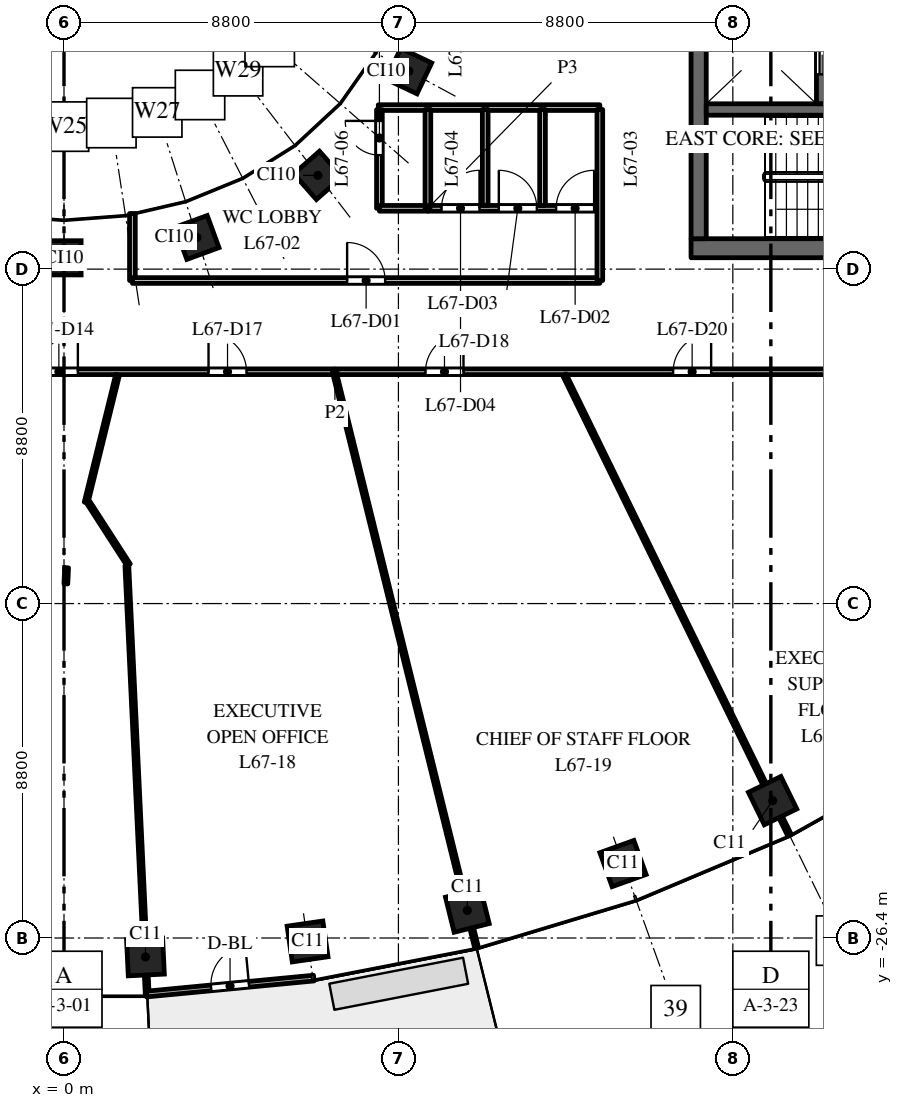
"""IFC4 building model, lengths in metres.
Left out: names, types, materials, properties, quantities, classifications, styles, units other than length and angle.
Written with IfcOpenShell. Run it as: python <this file> out.ifc"""

import sys

from ifc_helpers import new_model, si_unit, direction, frame, frame_2d, origin, origin_2d, place, context, subcontext, project, spatial, rectangle, extrude, element, fill, save


model = new_model("IFC4")
c1 = context("Model", 3, precision=1e-05, world=origin(), true_north=direction((0.0, 1.0)))
c2 = subcontext(c1, "Body", "Model", "MODEL_VIEW")
j1 = project(units=[si_unit("LENGTHUNIT", "METRE"), si_unit("PLANEANGLEUNIT", "RADIAN")], contexts=[c1])
p1 = place(None, origin())
s1 = spatial("IfcSite", under=j1, at=p1, CompositionType="ELEMENT")
p2 = place(p1, origin())
s2 = spatial("IfcBuilding", under=s1, at=p2, CompositionType="ELEMENT")
p3 = place(p2, frame((0.0, 0.0, 311.0)))
s3 = spatial("IfcBuildingStorey", under=s2, at=p3, CompositionType="ELEMENT", Elevation=311.0)
for number, where, z_axis, x_axis in (
    (1, (2.143, -26.898, 0.0), (0.0, 0.0, 1.0), (0.999, 0.048, 0.0)),
    (2, (6.409, -26.491, 0.0), (0.0, 0.0, 1.0), (0.99, 0.143, 0.0)),
    (3, (10.613, -25.674, 0.0), (0.0, 0.0, 1.0), (0.971, 0.24, 0.0)),
    (4, (14.709, -24.441, 0.0), (0.0, 0.0, 1.0), (0.941, 0.338, 0.0)),
    (5, (18.646, -22.785, 0.0), (0.0, 0.0, 1.0), (0.898, 0.439, 0.0)),
):
    element("IfcColumn", number, at=place(p3, frame(where, z_axis=z_axis, x_axis=x_axis)), inside=s3, PredefinedType="COLUMN", context=c2, shape_type="SweptSolid", body=[
        extrude(rectangle(XDim=0.95, YDim=0.95, at=origin_2d()), origin(), (0.0, 0.0, 1.0), 4.0),
    ])
for number, where, z_axis, x_axis in (
    (6, (0.0, -8.503, 0.0), (0.0, 0.0, 1.0), (1.0, 0.0, 0.0)),
    (7, (3.501, -7.967, 0.0), (0.0, 0.0, 1.0), (0.939, 0.344, 0.0)),
    (8, (6.682, -6.334, 0.0), (0.0, 0.0, 1.0), (0.751, 0.66, 0.0)),
    (9, (9.076, -3.588, 0.0), (0.0, 0.0, 1.0), (0.429, 0.903, 0.0)),
):
    element("IfcColumn", number, at=place(p3, frame(where, z_axis=z_axis, x_axis=x_axis)), inside=s3, PredefinedType="COLUMN", context=c2, shape_type="SweptSolid", body=[
        extrude(rectangle(XDim=0.9, YDim=0.9, at=origin_2d()), origin(), (0.0, 0.0, 1.0), 4.0),
    ])
p4 = place(p3, frame((16.5, -8.25, 0.0), z_axis=(0.0, 0.0, 1.0), x_axis=(1.0, 0.0, 0.0)))
e10 = element("IfcWall", 10, at=p4, inside=s3, PredefinedType="SHEAR", context=c2, shape_type="SweptSolid", body=[
    extrude(rectangle(XDim=15.0, YDim=0.5, at=frame_2d((7.5, 0.0))), origin(), (0.0, 0.0, 1.0), 3.7),
])
p5 = place(p4, frame((6.9, 0.0, 0.0)))
e11 = element("IfcOpeningElement", 11, at=p5, cuts=e10, PredefinedType="OPENING", context=c2, shape_type="SweptSolid", body=[
    extrude(rectangle(XDim=1.2, YDim=2.1, at=frame_2d((0.6, 1.05))), frame((0.0, 0.26, 0.0), z_axis=(0.0, -1.0, 0.0), x_axis=(1.0, 0.0, 0.0)), (0.0, 0.0, 1.0), 0.52),
])
p6 = place(p4, frame((12.275, 0.0, 0.0)))
e12 = element("IfcOpeningElement", 12, at=p6, cuts=e10, PredefinedType="OPENING", context=c2, shape_type="SweptSolid", body=[
    extrude(rectangle(XDim=0.9, YDim=2.1, at=frame_2d((0.45, 1.05))), frame((0.0, 0.26, 0.0), z_axis=(0.0, -1.0, 0.0), x_axis=(1.0, 0.0, 0.0)), (0.0, 0.0, 1.0), 0.52),
])
p7 = place(p3, frame((19.95, -4.45, 0.0), z_axis=(0.0, 0.0, 1.0), x_axis=(0.0, 1.0, 0.0)))
e13 = element("IfcWall", 13, at=p7, inside=s3, PredefinedType="SHEAR", context=c2, shape_type="SweptSolid", body=[
    extrude(rectangle(XDim=8.9, YDim=0.3, at=frame_2d((4.45, 0.0))), origin(), (0.0, 0.0, 1.0), 3.7),
])
p8 = place(p7, frame((0.775, 0.0, 0.0)))
e14 = element("IfcOpeningElement", 14, at=p8, cuts=e13, PredefinedType="OPENING", context=c2, shape_type="SweptSolid", body=[
    extrude(rectangle(XDim=1.2, YDim=2.1, at=frame_2d((0.6, 1.05))), frame((0.0, 0.16, 0.0), z_axis=(0.0, -1.0, 0.0), x_axis=(1.0, 0.0, 0.0)), (0.0, 0.0, 1.0), 0.32),
])
p9 = place(p7, frame((6.0, 0.0, 0.0)))
e15 = element("IfcOpeningElement", 15, at=p9, cuts=e13, PredefinedType="OPENING", context=c2, shape_type="SweptSolid", body=[
    extrude(rectangle(XDim=0.9, YDim=2.1, at=frame_2d((0.45, 1.05))), frame((0.0, 0.16, 0.0), z_axis=(0.0, -1.0, 0.0), x_axis=(1.0, 0.0, 0.0)), (0.0, 0.0, 1.0), 0.32),
])
p10 = place(p3, frame((16.7, -8.0, 0.0), z_axis=(0.0, 0.0, 1.0), x_axis=(0.0, 1.0, 0.0)))
e16 = element("IfcWall", 16, at=p10, inside=s3, PredefinedType="SHEAR", context=c2, shape_type="SweptSolid", body=[
    extrude(rectangle(XDim=16.0, YDim=0.4, at=frame_2d((8.0, 0.0))), origin(), (0.0, 0.0, 1.0), 3.7),
])
p11 = place(p3, frame((16.9, -4.6, 0.0), z_axis=(0.0, 0.0, 1.0), x_axis=(1.0, 0.0, 0.0)))
e17 = element("IfcWall", 17, at=p11, inside=s3, PredefinedType="SHEAR", context=c2, shape_type="SweptSolid", body=[
    extrude(rectangle(XDim=6.18, YDim=0.3, at=frame_2d((3.09, 0.0))), origin(), (0.0, 0.0, 1.0), 3.7),
])
p12 = place(p11, frame((4.9, 0.0, 0.0)))
e18 = element("IfcOpeningElement", 18, at=p12, cuts=e17, PredefinedType="OPENING", context=c2, shape_type="SweptSolid", body=[
    extrude(rectangle(XDim=1.1, YDim=2.1, at=frame_2d((0.55, 1.05))), frame((0.0, 0.16, 0.0), z_axis=(0.0, -1.0, 0.0), x_axis=(1.0, 0.0, 0.0)), (0.0, 0.0, 1.0), 0.32),
])
p13 = place(p3, frame((2.166, -27.875, 0.0), z_axis=(0.0, 0.0, 1.0), x_axis=(0.995473879823, 0.095035543824, 0.0)))
e19 = element("IfcWall", 19, at=p13, inside=s3, PredefinedType="STANDARD", context=c2, shape_type="SweptSolid", body=[
    extrude(rectangle(XDim=4.426, YDim=0.15, at=frame_2d((2.213, 0.0))), origin(), (0.0, 0.0, 1.0), 3.7),
])
p14 = place(p13, frame((1.713, 0.0, 0.0)))
e20 = element("IfcOpeningElement", 20, at=p14, cuts=e19, PredefinedType="OPENING", context=c2, shape_type="SweptSolid", body=[
    extrude(rectangle(XDim=1.0, YDim=2.4, at=frame_2d((0.5, 1.2))), frame((0.0, 0.085, 0.0), z_axis=(0.0, -1.0, 0.0), x_axis=(1.0, 0.0, 0.0)), (0.0, 0.0, 1.0), 0.17),
])
p15 = place(p3, frame((-1.774, -11.5, 0.0), z_axis=(0.0, 0.0, 1.0), x_axis=(1.0, 0.0, 0.0)))
e21 = element("IfcWall", 21, at=p15, inside=s3, PredefinedType="PARTITIONING", context=c2, shape_type="SweptSolid", body=[
    extrude(rectangle(XDim=8.886, YDim=0.15, at=frame_2d((4.443, 0.0))), origin(), (0.0, 0.0, 1.0), 2.85),
])
p16 = place(p15, frame((1.139, 0.0, 0.0)))
e22 = element("IfcOpeningElement", 22, at=p16, cuts=e21, PredefinedType="OPENING", context=c2, shape_type="SweptSolid", body=[
    extrude(rectangle(XDim=1.0, YDim=2.1, at=frame_2d((0.5, 1.05))), frame((0.0, 0.085, 0.0), z_axis=(0.0, -1.0, 0.0), x_axis=(1.0, 0.0, 0.0)), (0.0, 0.0, 1.0), 0.17),
])
p17 = place(p15, frame((5.577, 0.0, 0.0)))
e23 = element("IfcOpeningElement", 23, at=p17, cuts=e21, PredefinedType="OPENING", context=c2, shape_type="SweptSolid", body=[
    extrude(rectangle(XDim=1.0, YDim=2.1, at=frame_2d((0.5, 1.05))), frame((0.0, 0.085, 0.0), z_axis=(0.0, -1.0, 0.0), x_axis=(1.0, 0.0, 0.0)), (0.0, 0.0, 1.0), 0.17),
])
p18 = place(p3, frame((0.049, -17.081, 0.0), z_axis=(0.0, 0.0, 1.0), x_axis=(0.047263912187, 0.998882436829, 0.0)))
e24 = element("IfcWall", 24, at=p18, inside=s3, PredefinedType="PARTITIONING", context=c2, shape_type="SweptSolid", body=[
    extrude(rectangle(XDim=0.424, YDim=0.1, at=frame_2d((0.212, 0.0))), origin(), (0.0, 0.0, 1.0), 3.7),
])
p19 = place(p3, frame((0.582, -14.941, 0.0), z_axis=(0.0, 0.0, 1.0), x_axis=(0.239198168936, 0.970970769888, 0.0)))
e25 = element("IfcWall", 25, at=p19, inside=s3, PredefinedType="PARTITIONING", context=c2, shape_type="SweptSolid", body=[
    extrude(rectangle(XDim=1.601, YDim=0.1, at=frame_2d((0.801, 0.0))), origin(), (0.0, 0.0, 1.0), 3.7),
])
p20 = place(p3, frame((0.635, -14.932, 0.0), z_axis=(0.0, 0.0, 1.0), x_axis=(0.542268183011, -0.840205461595, 0.0)))
e26 = element("IfcWall", 26, at=p20, inside=s3, PredefinedType="PARTITIONING", context=c2, shape_type="SweptSolid", body=[
    extrude(rectangle(XDim=1.968, YDim=0.1, at=frame_2d((0.984, 0.0))), origin(), (0.0, 0.0, 1.0), 3.7),
])
p21 = place(p3, frame((0.969, -13.369, 0.0), z_axis=(0.0, 0.0, 1.0), x_axis=(0.239699020522, 0.970847248315, 0.0)))
e27 = element("IfcWall", 27, at=p21, inside=s3, PredefinedType="PARTITIONING", context=c2, shape_type="SweptSolid", body=[
    extrude(rectangle(XDim=1.844, YDim=0.1, at=frame_2d((0.922, 0.0))), origin(), (0.0, 0.0, 1.0), 3.7),
])
p22 = place(p3, frame((1.654, -16.601, 0.0), z_axis=(0.0, 0.0, 1.0), x_axis=(0.047383612141, -0.998876765823, 0.0)))
e28 = element("IfcWall", 28, at=p22, inside=s3, PredefinedType="PARTITIONING", context=c2, shape_type="SweptSolid", body=[
    extrude(rectangle(XDim=11.31, YDim=0.1, at=frame_2d((5.655, 0.0))), origin(), (0.0, 0.0, 1.0), 3.0),
])
p23 = place(p3, frame((1.8, -9.1, 0.0), z_axis=(0.0, 0.0, 1.0), x_axis=(0.0, 1.0, 0.0)))
e29 = element("IfcWall", 29, at=p23, inside=s3, PredefinedType="PARTITIONING", context=c2, shape_type="SweptSolid", body=[
    extrude(rectangle(XDim=1.764, YDim=0.15, at=frame_2d((0.882, 0.0))), origin(), (0.0, 0.0, 1.0), 3.0),
])
p24 = place(p3, frame((1.8, -9.1, 0.0), z_axis=(0.0, 0.0, 1.0), x_axis=(1.0, 0.0, 0.0)))
e30 = element("IfcWall", 30, at=p24, inside=s3, PredefinedType="PARTITIONING", context=c2, shape_type="SweptSolid", body=[
    extrude(rectangle(XDim=12.3, YDim=0.15, at=frame_2d((6.15, 0.0))), origin(), (0.0, 0.0, 1.0), 2.85),
])
p25 = place(p24, frame((5.65, 0.0, 0.0)))
e31 = element("IfcOpeningElement", 31, at=p25, cuts=e30, PredefinedType="OPENING", context=c2, shape_type="SweptSolid", body=[
    extrude(rectangle(XDim=1.0, YDim=2.1, at=frame_2d((0.5, 1.05))), frame((0.0, 0.085, 0.0), z_axis=(0.0, -1.0, 0.0), x_axis=(1.0, 0.0, 0.0)), (0.0, 0.0, 1.0), 0.17),
])
p26 = place(p3, frame((7.112, -11.5, 0.0), z_axis=(0.0, 0.0, 1.0), x_axis=(0.239846808941, -0.970810747901, 0.0)))
e32 = element("IfcWall", 32, at=p26, inside=s3, PredefinedType="PARTITIONING", context=c2, shape_type="SweptSolid", body=[
    extrude(rectangle(XDim=15.601, YDim=0.1, at=frame_2d((7.801, 0.0))), origin(), (0.0, 0.0, 1.0), 2.85),
])
p27 = place(p3, frame((7.129, -11.5, 0.0), z_axis=(0.0, 0.0, 1.0), x_axis=(1.0, 0.0, 0.0)))
e33 = element("IfcWall", 33, at=p27, inside=s3, PredefinedType="PARTITIONING", context=c2, shape_type="SweptSolid", body=[
    extrude(rectangle(XDim=24.371, YDim=0.15, at=frame_2d((12.186, 0.0))), origin(), (0.0, 0.0, 1.0), 2.75),
])
p28 = place(p27, frame((2.383, 0.0, 0.0)))
e34 = element("IfcOpeningElement", 34, at=p28, cuts=e33, PredefinedType="OPENING", context=c2, shape_type="SweptSolid", body=[
    extrude(rectangle(XDim=1.0, YDim=2.1, at=frame_2d((0.5, 1.05))), frame((0.0, 0.085, 0.0), z_axis=(0.0, -1.0, 0.0), x_axis=(1.0, 0.0, 0.0)), (0.0, 0.0, 1.0), 0.17),
])
p29 = place(p27, frame((8.9, 0.0, 0.0)))
e35 = element("IfcOpeningElement", 35, at=p29, cuts=e33, PredefinedType="OPENING", context=c2, shape_type="SweptSolid", body=[
    extrude(rectangle(XDim=1.0, YDim=2.1, at=frame_2d((0.5, 1.05))), frame((0.0, 0.085, 0.0), z_axis=(0.0, -1.0, 0.0), x_axis=(1.0, 0.0, 0.0)), (0.0, 0.0, 1.0), 0.17),
])
p30 = place(p27, frame((17.894, 0.0, 0.0)))
e36 = element("IfcOpeningElement", 36, at=p30, cuts=e33, PredefinedType="OPENING", context=c2, shape_type="SweptSolid", body=[
    extrude(rectangle(XDim=1.0, YDim=2.1, at=frame_2d((0.5, 1.05))), frame((0.0, 0.085, 0.0), z_axis=(0.0, -1.0, 0.0), x_axis=(1.0, 0.0, 0.0)), (0.0, 0.0, 1.0), 0.17),
])
p31 = place(p3, frame((8.271, -4.55, 0.0), z_axis=(0.0, 0.0, 1.0), x_axis=(1.0, 0.0, 0.0)))
e37 = element("IfcWall", 37, at=p31, inside=s3, PredefinedType="PARTITIONING", context=c2, shape_type="SweptSolid", body=[
    extrude(rectangle(XDim=5.829, YDim=0.15, at=frame_2d((2.915, 0.0))), origin(), (0.0, 0.0, 1.0), 2.75),
])
p32 = place(p3, frame((8.3, -7.2, 0.0), z_axis=(0.0, 0.0, 1.0), x_axis=(0.0, 1.0, 0.0)))
e38 = element("IfcWall", 38, at=p32, inside=s3, PredefinedType="PARTITIONING", context=c2, shape_type="SweptSolid", body=[
    extrude(rectangle(XDim=2.596, YDim=0.15, at=frame_2d((1.298, 0.0))), origin(), (0.0, 0.0, 1.0), 3.7),
])
p33 = place(p32, frame((1.4, 0.0, 0.0)))
e39 = element("IfcOpeningElement", 39, at=p33, cuts=e38, PredefinedType="OPENING", context=c2, shape_type="SweptSolid", body=[
    extrude(rectangle(XDim=0.9, YDim=2.1, at=frame_2d((0.45, 1.05))), frame((0.0, 0.085, 0.0), z_axis=(0.0, -1.0, 0.0), x_axis=(1.0, 0.0, 0.0)), (0.0, 0.0, 1.0), 0.17),
])
p34 = place(p3, frame((8.3, -7.2, 0.0), z_axis=(0.0, 0.0, 1.0), x_axis=(1.0, 0.0, 0.0)))
e40 = element("IfcWall", 40, at=p34, inside=s3, PredefinedType="PARTITIONING", context=c2, shape_type="SweptSolid", body=[
    extrude(rectangle(XDim=1.276, YDim=0.15, at=frame_2d((0.638, 0.0))), origin(), (0.0, 0.0, 1.0), 3.7),
])
p35 = place(p3, frame((9.576, -7.2, 0.0), z_axis=(0.0, 0.0, 1.0), x_axis=(0.0, 1.0, 0.0)))
e41 = element("IfcWall", 41, at=p35, inside=s3, PredefinedType="PARTITIONING", context=c2, shape_type="SweptSolid", body=[
    extrude(rectangle(XDim=2.6, YDim=0.15, at=frame_2d((1.3, 0.0))), origin(), (0.0, 0.0, 1.0), 2.75),
])
p36 = place(p3, frame((9.576, -7.2, 0.0), z_axis=(0.0, 0.0, 1.0), x_axis=(1.0, 0.0, 0.0)))
e42 = element("IfcWall", 42, at=p36, inside=s3, PredefinedType="PARTITIONING", context=c2, shape_type="SweptSolid", body=[
    extrude(rectangle(XDim=4.449, YDim=0.15, at=frame_2d((2.225, 0.0))), origin(), (0.0, 0.0, 1.0), 2.75),
])
p37 = place(p36, frame((3.374, 0.0, 0.0)))
e43 = element("IfcOpeningElement", 43, at=p37, cuts=e42, PredefinedType="OPENING", context=c2, shape_type="SweptSolid", body=[
    extrude(rectangle(XDim=1.0, YDim=2.1, at=frame_2d((0.5, 1.05))), frame((0.0, 0.085, 0.0), z_axis=(0.0, -1.0, 0.0), x_axis=(1.0, 0.0, 0.0)), (0.0, 0.0, 1.0), 0.17),
])
p38 = place(p36, frame((1.866, 0.0, 0.0)))
e44 = element("IfcOpeningElement", 44, at=p38, cuts=e42, PredefinedType="OPENING", context=c2, shape_type="SweptSolid", body=[
    extrude(rectangle(XDim=1.0, YDim=2.1, at=frame_2d((0.5, 1.05))), frame((0.0, 0.085, 0.0), z_axis=(0.0, -1.0, 0.0), x_axis=(1.0, 0.0, 0.0)), (0.0, 0.0, 1.0), 0.17),
])
p39 = place(p36, frame((0.358, 0.0, 0.0)))
e45 = element("IfcOpeningElement", 45, at=p39, cuts=e42, PredefinedType="OPENING", context=c2, shape_type="SweptSolid", body=[
    extrude(rectangle(XDim=1.0, YDim=2.1, at=frame_2d((0.5, 1.05))), frame((0.0, 0.085, 0.0), z_axis=(0.0, -1.0, 0.0), x_axis=(1.0, 0.0, 0.0)), (0.0, 0.0, 1.0), 0.17),
])
for number, where, z_axis, x_axis in (
    (46, (11.084, -7.125, 0.0), (0.0, 0.0, 1.0), (0.0, 1.0, 0.0)),
    (47, (12.592, -7.125, 0.0), (0.0, 0.0, 1.0), (0.0, 1.0, 0.0)),
):
    element("IfcWall", number, at=place(p3, frame(where, z_axis=z_axis, x_axis=x_axis)), inside=s3, PredefinedType="PARTITIONING", context=c2, shape_type="SweptSolid", body=[
        extrude(rectangle(XDim=2.525, YDim=0.15, at=frame_2d((1.262, 0.0))), origin(), (0.0, 0.0, 1.0), 2.75),
    ])
p40 = place(p3, frame((13.167, -11.579, 0.0), z_axis=(0.0, 0.0, 1.0), x_axis=(0.439238726833, -0.898370380661, 0.0)))
e48 = element("IfcWall", 48, at=p40, inside=s3, PredefinedType="PARTITIONING", context=c2, shape_type="SweptSolid", body=[
    extrude(rectangle(XDim=13.475, YDim=0.1, at=frame_2d((6.738, 0.0))), origin(), (0.0, 0.0, 1.0), 3.0),
])
p41 = place(p3, frame((14.1, -9.1, 0.0), z_axis=(0.0, 0.0, 1.0), x_axis=(0.0, 1.0, 0.0)))
e49 = element("IfcWall", 49, at=p41, inside=s3, PredefinedType="PARTITIONING", context=c2, shape_type="SweptSolid", body=[
    extrude(rectangle(XDim=4.5, YDim=0.15, at=frame_2d((2.25, 0.0))), origin(), (0.0, 0.0, 1.0), 2.75),
])
p42 = place(p8, origin())
e50 = element("IfcDoor", 50, at=p42, inside=s3, OperationType="DOUBLE_DOOR_SLIDING", PredefinedType="DOOR", context=c2, shape_type="SweptSolid", body=[
    extrude(rectangle(XDim=1.2, YDim=2.1, at=frame_2d((0.6, 1.05))), frame((0.0, 0.025, 0.0), z_axis=(0.0, -1.0, 0.0), x_axis=(1.0, 0.0, 0.0)), (0.0, 0.0, 1.0), 0.05),
])
fill(e14, e50)
p43 = place(p14, origin())
e51 = element("IfcDoor", 51, at=p43, inside=s3, OperationType="SINGLE_SWING_RIGHT", PredefinedType="DOOR", context=c2, shape_type="SweptSolid", body=[
    extrude(rectangle(XDim=1.0, YDim=2.4, at=frame_2d((0.5, 1.2))), frame((0.0, 0.025, 0.0), z_axis=(0.0, -1.0, 0.0), x_axis=(1.0, 0.0, 0.0)), (0.0, 0.0, 1.0), 0.05),
])
fill(e20, e51)
p44 = place(p25, origin())
e52 = element("IfcDoor", 52, at=p44, inside=s3, OperationType="SINGLE_SWING_LEFT", PredefinedType="DOOR", context=c2, shape_type="SweptSolid", body=[
    extrude(rectangle(XDim=1.0, YDim=2.1, at=frame_2d((0.5, 1.05))), frame((0.0, 0.025, 0.0), z_axis=(0.0, -1.0, 0.0), x_axis=(1.0, 0.0, 0.0)), (0.0, 0.0, 1.0), 0.05),
])
fill(e31, e52)
p45 = place(p37, origin())
e53 = element("IfcDoor", 53, at=p45, inside=s3, OperationType="SINGLE_SWING_RIGHT", PredefinedType="DOOR", context=c2, shape_type="SweptSolid", body=[
    extrude(rectangle(XDim=1.0, YDim=2.1, at=frame_2d((0.5, 1.05))), frame((0.0, 0.025, 0.0), z_axis=(0.0, -1.0, 0.0), x_axis=(1.0, 0.0, 0.0)), (0.0, 0.0, 1.0), 0.05),
])
fill(e43, e53)
p46 = place(p38, origin())
e54 = element("IfcDoor", 54, at=p46, inside=s3, OperationType="SINGLE_SWING_LEFT", PredefinedType="DOOR", context=c2, shape_type="SweptSolid", body=[
    extrude(rectangle(XDim=1.0, YDim=2.1, at=frame_2d((0.5, 1.05))), frame((0.0, 0.025, 0.0), z_axis=(0.0, -1.0, 0.0), x_axis=(1.0, 0.0, 0.0)), (0.0, 0.0, 1.0), 0.05),
])
fill(e44, e54)
p47 = place(p39, origin())
e55 = element("IfcDoor", 55, at=p47, inside=s3, OperationType="SINGLE_SWING_RIGHT", PredefinedType="DOOR", context=c2, shape_type="SweptSolid", body=[
    extrude(rectangle(XDim=1.0, YDim=2.1, at=frame_2d((0.5, 1.05))), frame((0.0, 0.025, 0.0), z_axis=(0.0, -1.0, 0.0), x_axis=(1.0, 0.0, 0.0)), (0.0, 0.0, 1.0), 0.05),
])
fill(e45, e55)
p48 = place(p33, origin())
e56 = element("IfcDoor", 56, at=p48, inside=s3, OperationType="SINGLE_SWING_RIGHT", PredefinedType="DOOR", context=c2, shape_type="SweptSolid", body=[
    extrude(rectangle(XDim=0.9, YDim=2.1, at=frame_2d((0.45, 1.05))), frame((0.0, 0.025, 0.0), z_axis=(0.0, -1.0, 0.0), x_axis=(1.0, 0.0, 0.0)), (0.0, 0.0, 1.0), 0.05),
])
fill(e39, e56)
p49 = place(p16, origin())
e57 = element("IfcDoor", 57, at=p49, inside=s3, OperationType="SINGLE_SWING_RIGHT", PredefinedType="DOOR", context=c2, shape_type="SweptSolid", body=[
    extrude(rectangle(XDim=1.0, YDim=2.1, at=frame_2d((0.5, 1.05))), frame((0.0, 0.025, 0.0), z_axis=(0.0, -1.0, 0.0), x_axis=(1.0, 0.0, 0.0)), (0.0, 0.0, 1.0), 0.05),
])
fill(e22, e57)
p50 = place(p17, origin())
e58 = element("IfcDoor", 58, at=p50, inside=s3, OperationType="SINGLE_SWING_LEFT", PredefinedType="DOOR", context=c2, shape_type="SweptSolid", body=[
    extrude(rectangle(XDim=1.0, YDim=2.1, at=frame_2d((0.5, 1.05))), frame((0.0, 0.025, 0.0), z_axis=(0.0, -1.0, 0.0), x_axis=(1.0, 0.0, 0.0)), (0.0, 0.0, 1.0), 0.05),
])
fill(e23, e58)
p51 = place(p28, origin())
e59 = element("IfcDoor", 59, at=p51, inside=s3, OperationType="SINGLE_SWING_RIGHT", PredefinedType="DOOR", context=c2, shape_type="SweptSolid", body=[
    extrude(rectangle(XDim=1.0, YDim=2.1, at=frame_2d((0.5, 1.05))), frame((0.0, 0.025, 0.0), z_axis=(0.0, -1.0, 0.0), x_axis=(1.0, 0.0, 0.0)), (0.0, 0.0, 1.0), 0.05),
])
fill(e34, e59)
p52 = place(p29, origin())
e60 = element("IfcDoor", 60, at=p52, inside=s3, OperationType="SINGLE_SWING_RIGHT", PredefinedType="DOOR", context=c2, shape_type="SweptSolid", body=[
    extrude(rectangle(XDim=1.0, YDim=2.1, at=frame_2d((0.5, 1.05))), frame((0.0, 0.025, 0.0), z_axis=(0.0, -1.0, 0.0), x_axis=(1.0, 0.0, 0.0)), (0.0, 0.0, 1.0), 0.05),
])
fill(e35, e60)
save(model, sys.argv[1])
